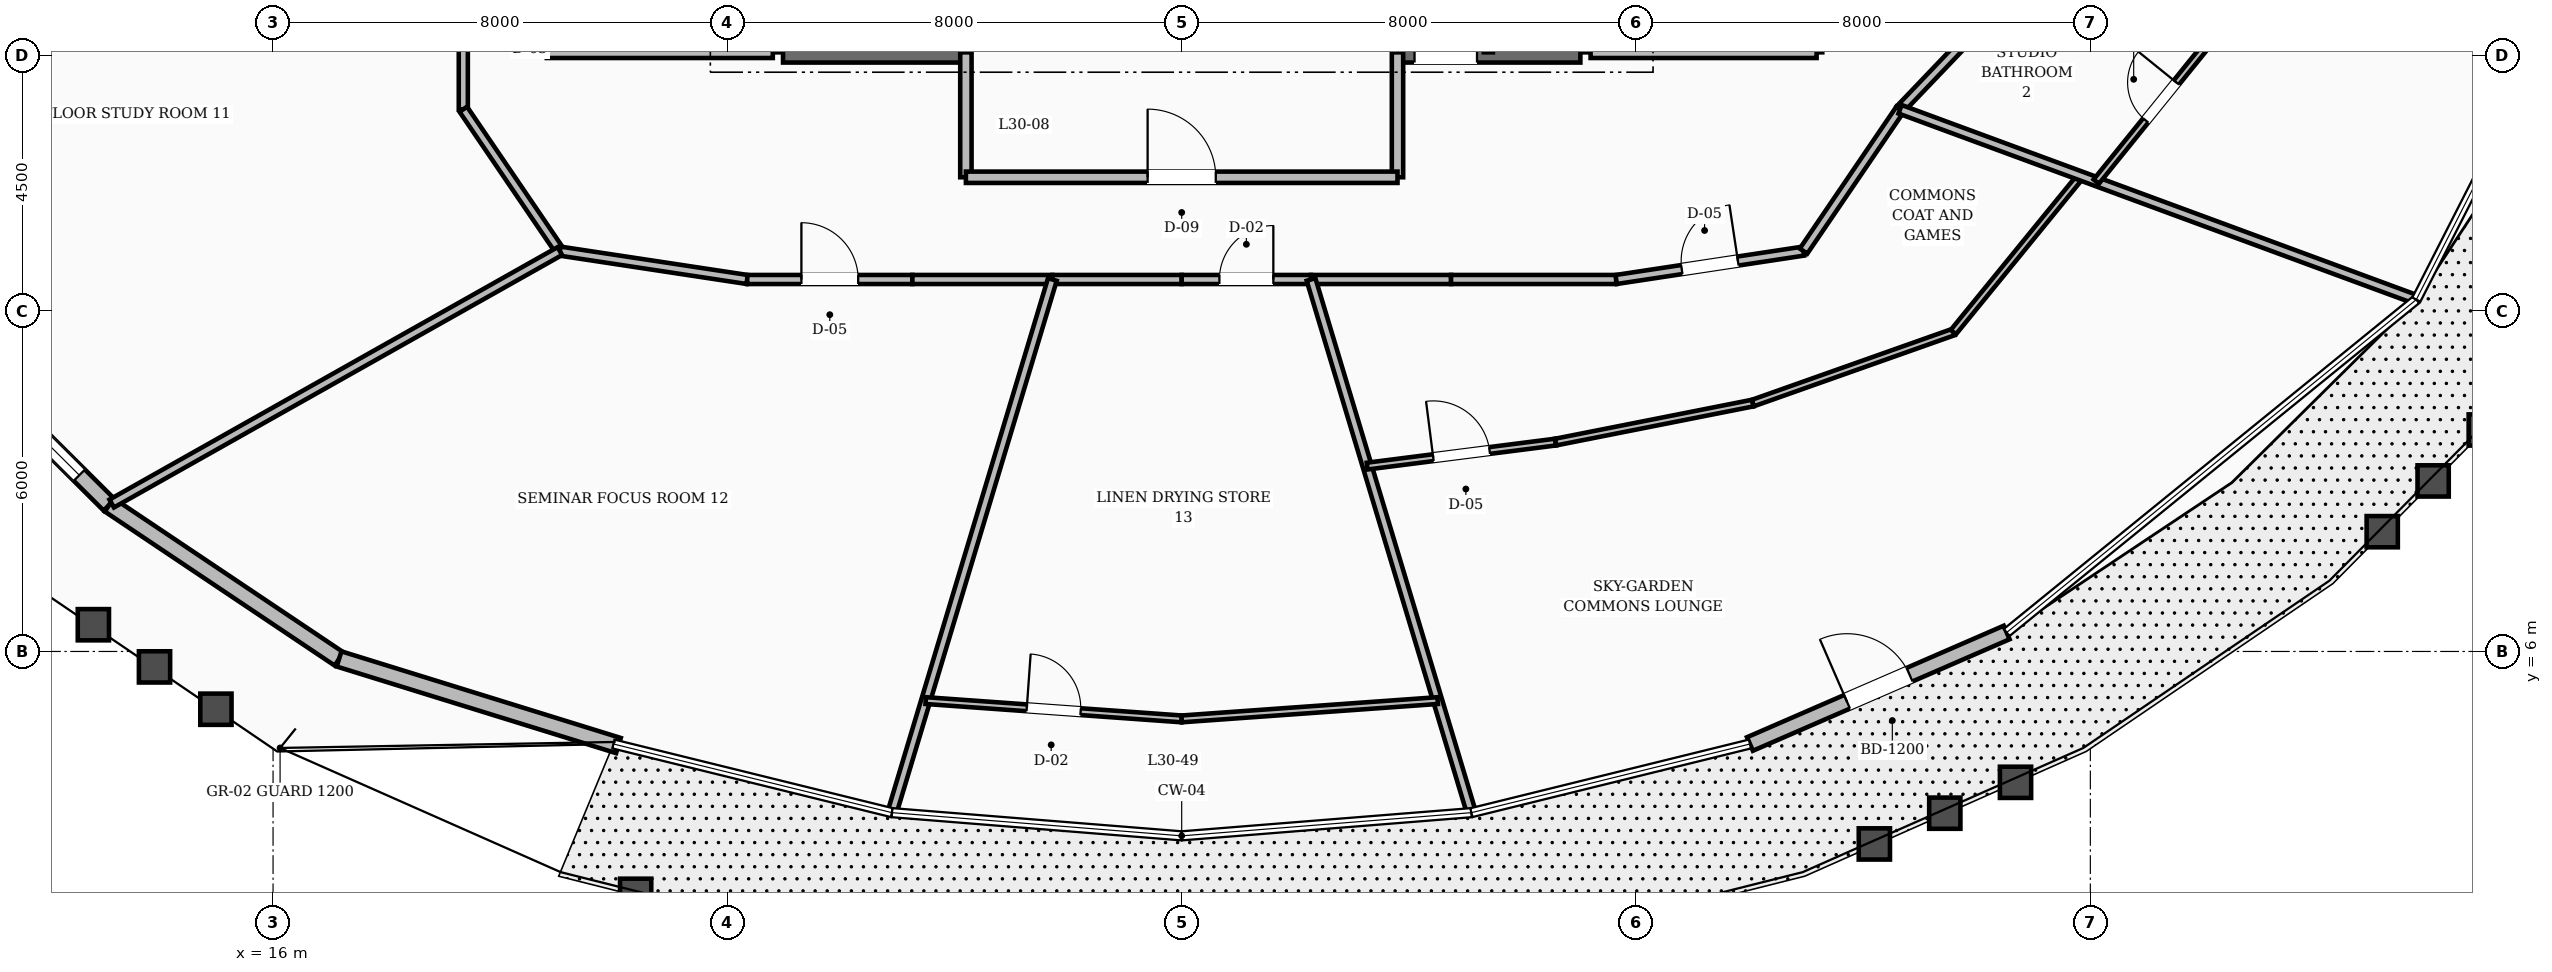
"""IFC4 building model, lengths in metres.
Left out: names, types, materials, properties, quantities, classifications, styles, units other than length and angle.
Written with IfcOpenShell. Run it as: python <this file> out.ifc"""

import sys

from ifc_helpers import new_model, si_unit, direction, frame, frame_2d, origin, place, context, subcontext, project, spatial, rectangle, extrude, element, fill, save


model = new_model("IFC4")
c1 = context("Model", 3, precision=1e-05, world=origin(), true_north=direction((0.0, 1.0)))
c2 = subcontext(c1, "Body", "Model", "MODEL_VIEW")
j1 = project(units=[si_unit("LENGTHUNIT", "METRE"), si_unit("PLANEANGLEUNIT", "RADIAN")], contexts=[c1])
p1 = place(None, origin())
s1 = spatial("IfcSite", under=j1, at=p1, CompositionType="ELEMENT")
p2 = place(p1, origin())
s2 = spatial("IfcBuilding", under=s1, at=p2, CompositionType="ELEMENT")
p3 = place(p2, frame((0.0, 0.0, 120.8)))
s3 = spatial("IfcBuildingStorey", under=s2, at=p3, CompositionType="ELEMENT", Elevation=120.8)
p4 = place(p3, frame((24.98, 16.55, 0.0), z_axis=(0.0, 0.0, 1.0), x_axis=(1.0, 0.0, 0.0)))
e1 = element("IfcWall", 1, at=p4, inside=s3, PredefinedType="SHEAR", context=c2, shape_type="SweptSolid", body=[
    extrude(rectangle(XDim=3.22, YDim=0.36, at=frame_2d((1.61, 0.0))), origin(), (0.0, 0.0, 1.0), 3.6),
])
p5 = place(p3, frame((35.8, 16.55, 0.0), z_axis=(0.0, 0.0, 1.0), x_axis=(1.0, 0.0, 0.0)))
e2 = element("IfcWall", 2, at=p5, inside=s3, PredefinedType="SHEAR", context=c2, shape_type="SweptSolid", body=[
    extrude(rectangle(XDim=3.22, YDim=0.36, at=frame_2d((1.61, 0.0))), origin(), (0.0, 0.0, 1.0), 3.6),
])
p6 = place(p5, frame((0.3, 0.0, 0.0)))
e3 = element("IfcOpeningElement", 3, at=p6, cuts=e2, PredefinedType="OPENING", context=c2, shape_type="SweptSolid", body=[
    extrude(rectangle(XDim=1.1, YDim=2.1, at=frame_2d((0.55, 1.05))), frame((0.0, 0.19, 0.0), z_axis=(0.0, -1.0, 0.0), x_axis=(1.0, 0.0, 0.0)), (0.0, 0.0, 1.0), 0.38),
])
p7 = place(p3, frame((9.794, 11.885, 0.0), z_axis=(0.0, 0.0, 1.0), x_axis=(0.708876231206, -0.705332892208, 0.0)))
e4 = element("IfcWall", 4, at=p7, inside=s3, PredefinedType="STANDARD", context=c2, shape_type="SweptSolid", body=[
    extrude(rectangle(XDim=4.685, YDim=0.28, at=frame_2d((2.343, 0.0))), origin(), (0.0, 0.0, 1.0), 2.82),
])
p8 = place(p7, frame((0.743, 0.0, 0.8)))
e5 = element("IfcOpeningElement", 5, at=p8, cuts=e4, PredefinedType="OPENING", context=c2, shape_type="SweptSolid", body=[
    extrude(rectangle(XDim=3.2, YDim=1.65, at=frame_2d((1.6, 0.825))), frame((0.0, 0.15, 0.0), z_axis=(0.0, -1.0, 0.0), x_axis=(1.0, 0.0, 0.0)), (0.0, 0.0, 1.0), 0.3),
])
p9 = place(p3, frame((13.115, 8.58, 0.0), z_axis=(0.0, 0.0, 1.0), x_axis=(0.830737301714, -0.556664652678, 0.0)))
e6 = element("IfcWall", 6, at=p9, inside=s3, PredefinedType="STANDARD", context=c2, shape_type="SweptSolid", body=[
    extrude(rectangle(XDim=4.872, YDim=0.28, at=frame_2d((2.436, 0.0))), origin(), (0.0, 0.0, 1.0), 2.82),
])
p10 = place(p3, frame((17.162, 5.868, 0.0), z_axis=(0.0, 0.0, 1.0), x_axis=(0.955164029164, -0.2960771477, 0.0)))
e7 = element("IfcWall", 7, at=p10, inside=s3, PredefinedType="STANDARD", context=c2, shape_type="SweptSolid", body=[
    extrude(rectangle(XDim=5.15, YDim=0.28, at=frame_2d((2.575, 0.0))), origin(), (0.0, 0.0, 1.0), 2.82),
])
p11 = place(p3, frame((42.006, 4.37, 0.0), z_axis=(0.0, 0.0, 1.0), x_axis=(0.917222773232, 0.398374678242, 0.0)))
e8 = element("IfcWall", 8, at=p11, inside=s3, PredefinedType="STANDARD", context=c2, shape_type="SweptSolid", body=[
    extrude(rectangle(XDim=4.928, YDim=0.26, at=frame_2d((2.464, 0.0))), origin(), (0.0, 0.0, 1.0), 2.82),
])
p12 = place(p11, frame((1.864, 0.0, 0.0)))
e9 = element("IfcOpeningElement", 9, at=p12, cuts=e8, PredefinedType="OPENING", context=c2, shape_type="SweptSolid", body=[
    extrude(rectangle(XDim=1.2, YDim=2.15, at=frame_2d((0.6, 1.075))), frame((0.0, 0.14, 0.0), z_axis=(0.0, -1.0, 0.0), x_axis=(1.0, 0.0, 0.0)), (0.0, 0.0, 1.0), 0.28),
])
for number, where, z_axis, x_axis in (
    (10, (20.82, 16.55, 0.0), (0.0, 0.0, 1.0), (1.0, 0.0, 0.0)),
    (11, (39.2, 16.55, 0.0), (0.0, 0.0, 1.0), (1.0, 0.0, 0.0)),
):
    element("IfcWall", number, at=place(p3, frame(where, z_axis=z_axis, x_axis=x_axis)), inside=s3, PredefinedType="SOLIDWALL", context=c2, shape_type="SweptSolid", body=[
        extrude(rectangle(XDim=3.98, YDim=0.2, at=frame_2d((1.99, 0.0))), origin(), (0.0, 0.0, 1.0), 2.8),
    ])
for number, where, z_axis, x_axis in (
    (12, (28.2, 14.35, 0.0), (0.0, 0.0, 1.0), (0.0, 1.0, 0.0)),
    (13, (35.8, 14.35, 0.0), (0.0, 0.0, 1.0), (0.0, 1.0, 0.0)),
):
    element("IfcWall", number, at=place(p3, frame(where, z_axis=z_axis, x_axis=x_axis)), inside=s3, PredefinedType="SOLIDWALL", context=c2, shape_type="SweptSolid", body=[
        extrude(rectangle(XDim=2.2, YDim=0.2, at=frame_2d((1.1, 0.0))), origin(), (0.0, 0.0, 1.0), 2.8),
    ])
p13 = place(p3, frame((28.2, 14.35, 0.0), z_axis=(0.0, 0.0, 1.0), x_axis=(1.0, 0.0, 0.0)))
e14 = element("IfcWall", 14, at=p13, inside=s3, PredefinedType="SOLIDWALL", context=c2, shape_type="SweptSolid", body=[
    extrude(rectangle(XDim=7.6, YDim=0.2, at=frame_2d((3.8, 0.0))), origin(), (0.0, 0.0, 1.0), 2.8),
])
p14 = place(p13, frame((3.2, 0.0, 0.0)))
e15 = element("IfcOpeningElement", 15, at=p14, cuts=e14, PredefinedType="OPENING", context=c2, shape_type="SweptSolid", body=[
    extrude(rectangle(XDim=1.2, YDim=2.1, at=frame_2d((0.6, 1.05))), frame((0.0, 0.11, 0.0), z_axis=(0.0, -1.0, 0.0), x_axis=(1.0, 0.0, 0.0)), (0.0, 0.0, 1.0), 0.22),
])
p15 = place(p3, frame((19.35, 18.76, 0.0), z_axis=(0.0, 0.0, 1.0), x_axis=(0.0, -1.0, 0.0)))
e16 = element("IfcWall", 16, at=p15, inside=s3, PredefinedType="SOLIDWALL", context=c2, shape_type="SweptSolid", body=[
    extrude(rectangle(XDim=3.213, YDim=0.16, at=frame_2d((1.606, 0.0))), origin(), (0.0, 0.0, 1.0), 2.8),
])
p16 = place(p15, frame((1.106, 0.0, 0.0)))
e17 = element("IfcOpeningElement", 17, at=p16, cuts=e16, PredefinedType="OPENING", context=c2, shape_type="SweptSolid", body=[
    extrude(rectangle(XDim=1.0, YDim=2.1, at=frame_2d((0.5, 1.05))), frame((0.0, 0.09, 0.0), z_axis=(0.0, -1.0, 0.0), x_axis=(1.0, 0.0, 0.0)), (0.0, 0.0, 1.0), 0.18),
])
p17 = place(p3, frame((19.35, 15.548, 0.0), z_axis=(0.0, 0.0, 1.0), x_axis=(0.562674669208, -0.826678423955, 0.0)))
e18 = element("IfcWall", 18, at=p17, inside=s3, PredefinedType="SOLIDWALL", context=c2, shape_type="SweptSolid", body=[
    extrude(rectangle(XDim=3.021, YDim=0.16, at=frame_2d((1.511, 0.0))), origin(), (0.0, 0.0, 1.0), 2.8),
])
p18 = place(p3, frame((21.05, 13.05, 0.0), z_axis=(0.0, 0.0, 1.0), x_axis=(0.988710906508, -0.149835721217, 0.0)))
e19 = element("IfcWall", 19, at=p18, inside=s3, PredefinedType="SOLIDWALL", context=c2, shape_type="SweptSolid", body=[
    extrude(rectangle(XDim=3.337, YDim=0.16, at=frame_2d((1.668, 0.0))), origin(), (0.0, 0.0, 1.0), 2.8),
])
p19 = place(p3, frame((24.349, 12.55, 0.0), z_axis=(0.0, 0.0, 1.0), x_axis=(1.0, 0.0, 0.0)))
e20 = element("IfcWall", 20, at=p19, inside=s3, PredefinedType="SOLIDWALL", context=c2, shape_type="SweptSolid", body=[
    extrude(rectangle(XDim=2.908, YDim=0.16, at=frame_2d((1.454, 0.0))), origin(), (0.0, 0.0, 1.0), 2.8),
])
p20 = place(p19, frame((0.954, 0.0, 0.0)))
e21 = element("IfcOpeningElement", 21, at=p20, cuts=e20, PredefinedType="OPENING", context=c2, shape_type="SweptSolid", body=[
    extrude(rectangle(XDim=1.0, YDim=2.1, at=frame_2d((0.5, 1.05))), frame((0.0, 0.09, 0.0), z_axis=(0.0, -1.0, 0.0), x_axis=(1.0, 0.0, 0.0)), (0.0, 0.0, 1.0), 0.18),
])
p21 = place(p3, frame((27.257, 12.55, 0.0), z_axis=(0.0, 0.0, 1.0), x_axis=(1.0, 0.0, 0.0)))
e22 = element("IfcWall", 22, at=p21, inside=s3, PredefinedType="SOLIDWALL", context=c2, shape_type="SweptSolid", body=[
    extrude(rectangle(XDim=2.465, YDim=0.16, at=frame_2d((1.232, 0.0))), origin(), (0.0, 0.0, 1.0), 2.8),
])
p22 = place(p3, frame((29.722, 12.55, 0.0), z_axis=(0.0, 0.0, 1.0), x_axis=(1.0, 0.0, 0.0)))
e23 = element("IfcWall", 23, at=p22, inside=s3, PredefinedType="SOLIDWALL", context=c2, shape_type="SweptSolid", body=[
    extrude(rectangle(XDim=2.278, YDim=0.16, at=frame_2d((1.139, 0.0))), origin(), (0.0, 0.0, 1.0), 2.8),
])
p23 = place(p3, frame((32.0, 12.55, 0.0), z_axis=(0.0, 0.0, 1.0), x_axis=(1.0, 0.0, 0.0)))
e24 = element("IfcWall", 24, at=p23, inside=s3, PredefinedType="SOLIDWALL", context=c2, shape_type="SweptSolid", body=[
    extrude(rectangle(XDim=2.278, YDim=0.16, at=frame_2d((1.139, 0.0))), origin(), (0.0, 0.0, 1.0), 2.8),
])
p24 = place(p23, frame((0.664, 0.0, 0.0)))
e25 = element("IfcOpeningElement", 25, at=p24, cuts=e24, PredefinedType="OPENING", context=c2, shape_type="SweptSolid", body=[
    extrude(rectangle(XDim=0.95, YDim=2.1, at=frame_2d((0.475, 1.05))), frame((0.0, 0.09, 0.0), z_axis=(0.0, -1.0, 0.0), x_axis=(1.0, 0.0, 0.0)), (0.0, 0.0, 1.0), 0.18),
])
p25 = place(p3, frame((34.278, 12.55, 0.0), z_axis=(0.0, 0.0, 1.0), x_axis=(1.0, 0.0, 0.0)))
e26 = element("IfcWall", 26, at=p25, inside=s3, PredefinedType="SOLIDWALL", context=c2, shape_type="SweptSolid", body=[
    extrude(rectangle(XDim=2.465, YDim=0.16, at=frame_2d((1.232, 0.0))), origin(), (0.0, 0.0, 1.0), 2.8),
])
p26 = place(p3, frame((36.743, 12.55, 0.0), z_axis=(0.0, 0.0, 1.0), x_axis=(1.0, 0.0, 0.0)))
e27 = element("IfcWall", 27, at=p26, inside=s3, PredefinedType="SOLIDWALL", context=c2, shape_type="SweptSolid", body=[
    extrude(rectangle(XDim=2.908, YDim=0.16, at=frame_2d((1.454, 0.0))), origin(), (0.0, 0.0, 1.0), 2.8),
])
p27 = place(p3, frame((39.651, 12.55, 0.0), z_axis=(0.0, 0.0, 1.0), x_axis=(0.988710906508, 0.149835721217, 0.0)))
e28 = element("IfcWall", 28, at=p27, inside=s3, PredefinedType="SOLIDWALL", context=c2, shape_type="SweptSolid", body=[
    extrude(rectangle(XDim=3.337, YDim=0.16, at=frame_2d((1.668, 0.0))), origin(), (0.0, 0.0, 1.0), 2.8),
])
p28 = place(p27, frame((1.168, 0.0, 0.0)))
e29 = element("IfcOpeningElement", 29, at=p28, cuts=e28, PredefinedType="OPENING", context=c2, shape_type="SweptSolid", body=[
    extrude(rectangle(XDim=1.0, YDim=2.1, at=frame_2d((0.5, 1.05))), frame((0.0, 0.09, 0.0), z_axis=(0.0, -1.0, 0.0), x_axis=(1.0, 0.0, 0.0)), (0.0, 0.0, 1.0), 0.18),
])
p29 = place(p3, frame((42.95, 13.05, 0.0), z_axis=(0.0, 0.0, 1.0), x_axis=(0.562674669208, 0.826678423955, 0.0)))
e30 = element("IfcWall", 30, at=p29, inside=s3, PredefinedType="SOLIDWALL", context=c2, shape_type="SweptSolid", body=[
    extrude(rectangle(XDim=3.021, YDim=0.16, at=frame_2d((1.511, 0.0))), origin(), (0.0, 0.0, 1.0), 2.8),
])
p30 = place(p3, frame((44.65, 15.548, 0.0), z_axis=(0.0, 0.0, 1.0), x_axis=(0.691055487108, 0.722801711216, 0.0)))
e31 = element("IfcWall", 31, at=p30, inside=s3, PredefinedType="SOLIDWALL", context=c2, shape_type="SweptSolid", body=[
    extrude(rectangle(XDim=3.184, YDim=0.16, at=frame_2d((1.592, 0.0))), origin(), (0.0, 0.0, 1.0), 2.8),
])
p31 = place(p3, frame((34.278, 12.55, 0.0), z_axis=(0.0, 0.0, 1.0), x_axis=(0.287990783487, -0.957633180621, 0.0)))
e32 = element("IfcWall", 32, at=p31, inside=s3, PredefinedType="SOLIDWALL", context=c2, shape_type="SweptSolid", body=[
    extrude(rectangle(XDim=9.754, YDim=0.16, at=frame_2d((4.877, 0.0))), origin(), (0.0, 0.0, 1.0), 2.8),
])
p32 = place(p3, frame((35.266, 9.264, 0.0), z_axis=(0.0, 0.0, 1.0), x_axis=(0.991974135638, 0.126440951534, 0.0)))
e33 = element("IfcWall", 33, at=p32, inside=s3, PredefinedType="PARTITIONING", context=c2, shape_type="SweptSolid", body=[
    extrude(rectangle(XDim=3.346, YDim=0.12, at=frame_2d((1.673, 0.0))), origin(), (0.0, 0.0, 1.0), 2.8),
])
p33 = place(p32, frame((1.173, 0.0, 0.0)))
e34 = element("IfcOpeningElement", 34, at=p33, cuts=e33, PredefinedType="OPENING", context=c2, shape_type="SweptSolid", body=[
    extrude(rectangle(XDim=1.0, YDim=2.1, at=frame_2d((0.5, 1.05))), frame((0.0, 0.07, 0.0), z_axis=(0.0, -1.0, 0.0), x_axis=(1.0, 0.0, 0.0)), (0.0, 0.0, 1.0), 0.14),
])
p34 = place(p3, frame((38.585, 9.687, 0.0), z_axis=(0.0, 0.0, 1.0), x_axis=(0.980968713549, 0.194165864762, 0.0)))
e35 = element("IfcWall", 35, at=p34, inside=s3, PredefinedType="PARTITIONING", context=c2, shape_type="SweptSolid", body=[
    extrude(rectangle(XDim=3.54, YDim=0.12, at=frame_2d((1.77, 0.0))), origin(), (0.0, 0.0, 1.0), 2.8),
])
p35 = place(p3, frame((42.057, 10.374, 0.0), z_axis=(0.0, 0.0, 1.0), x_axis=(0.942681905686, 0.333692709977, 0.0)))
e36 = element("IfcWall", 36, at=p35, inside=s3, PredefinedType="PARTITIONING", context=c2, shape_type="SweptSolid", body=[
    extrude(rectangle(XDim=3.746, YDim=0.12, at=frame_2d((1.873, 0.0))), origin(), (0.0, 0.0, 1.0), 2.8),
])
p36 = place(p3, frame((45.588, 11.624, 0.0), z_axis=(0.0, 0.0, 1.0), x_axis=(0.632049552825, 0.774927972636, 0.0)))
e37 = element("IfcWall", 37, at=p36, inside=s3, PredefinedType="PARTITIONING", context=c2, shape_type="SweptSolid", body=[
    extrude(rectangle(XDim=3.549, YDim=0.12, at=frame_2d((1.774, 0.0))), origin(), (0.0, 0.0, 1.0), 2.8),
])
p37 = place(p3, frame((44.65, 15.548, 0.0), z_axis=(0.0, 0.0, 1.0), x_axis=(0.938256165997, -0.345941276764, 0.0)))
e38 = element("IfcWall", 38, at=p37, inside=s3, PredefinedType="SOLIDWALL", context=c2, shape_type="SweptSolid", body=[
    extrude(rectangle(XDim=9.639, YDim=0.16, at=frame_2d((4.819, 0.0))), origin(), (0.0, 0.0, 1.0), 2.8),
])
p38 = place(p3, frame((48.104, 14.274, 0.0), z_axis=(0.0, 0.0, 1.0), x_axis=(0.628681475745, 0.777662910299, 0.0)))
e39 = element("IfcWall", 39, at=p38, inside=s3, PredefinedType="PARTITIONING", context=c2, shape_type="SweptSolid", body=[
    extrude(rectangle(XDim=3.63, YDim=0.12, at=frame_2d((1.815, 0.0))), origin(), (0.0, 0.0, 1.0), 2.8),
])
p39 = place(p38, frame((1.385, 0.0, 0.0)))
e40 = element("IfcOpeningElement", 40, at=p39, cuts=e39, PredefinedType="OPENING", context=c2, shape_type="SweptSolid", body=[
    extrude(rectangle(XDim=0.86, YDim=2.1, at=frame_2d((0.43, 1.05))), frame((0.0, 0.07, 0.0), z_axis=(0.0, -1.0, 0.0), x_axis=(1.0, 0.0, 0.0)), (0.0, 0.0, 1.0), 0.14),
])
p40 = place(p3, frame((21.05, 13.05, 0.0), z_axis=(0.0, 0.0, 1.0), x_axis=(-0.871265811463, -0.490811456442, 0.0)))
e41 = element("IfcWall", 41, at=p40, inside=s3, PredefinedType="SOLIDWALL", context=c2, shape_type="SweptSolid", body=[
    extrude(rectangle(XDim=9.057, YDim=0.16, at=frame_2d((4.529, 0.0))), origin(), (0.0, 0.0, 1.0), 2.8),
])
p41 = place(p3, frame((29.722, 12.55, 0.0), z_axis=(0.0, 0.0, 1.0), x_axis=(-0.287990783487, -0.957633180621, 0.0)))
e42 = element("IfcWall", 42, at=p41, inside=s3, PredefinedType="SOLIDWALL", context=c2, shape_type="SweptSolid", body=[
    extrude(rectangle(XDim=9.754, YDim=0.16, at=frame_2d((4.877, 0.0))), origin(), (0.0, 0.0, 1.0), 2.8),
])
p42 = place(p3, frame((27.492, 5.135, 0.0), z_axis=(0.0, 0.0, 1.0), x_axis=(0.997450191448, -0.071366067427, 0.0)))
e43 = element("IfcWall", 43, at=p42, inside=s3, PredefinedType="PARTITIONING", context=c2, shape_type="SweptSolid", body=[
    extrude(rectangle(XDim=4.519, YDim=0.12, at=frame_2d((2.26, 0.0))), origin(), (0.0, 0.0, 1.0), 2.8),
])
p43 = place(p42, frame((1.784, 0.0, 0.0)))
e44 = element("IfcOpeningElement", 44, at=p43, cuts=e43, PredefinedType="OPENING", context=c2, shape_type="SweptSolid", body=[
    extrude(rectangle(XDim=0.95, YDim=2.1, at=frame_2d((0.475, 1.05))), frame((0.0, 0.07, 0.0), z_axis=(0.0, -1.0, 0.0), x_axis=(1.0, 0.0, 0.0)), (0.0, 0.0, 1.0), 0.14),
])
p44 = place(p3, frame((32.0, 4.812, 0.0), z_axis=(0.0, 0.0, 1.0), x_axis=(0.997450191448, 0.071366067427, 0.0)))
e45 = element("IfcWall", 45, at=p44, inside=s3, PredefinedType="PARTITIONING", context=c2, shape_type="SweptSolid", body=[
    extrude(rectangle(XDim=4.519, YDim=0.12, at=frame_2d((2.26, 0.0))), origin(), (0.0, 0.0, 1.0), 2.8),
])
p45 = place(p8, origin())
e46 = element("IfcWindow", 46, at=p45, inside=s3, PartitioningType="SINGLE_PANEL", PredefinedType="WINDOW", context=c2, shape_type="SweptSolid", body=[
    extrude(rectangle(XDim=3.2, YDim=1.65, at=frame_2d((1.6, 0.825))), frame((0.0, 0.03, 0.0), z_axis=(0.0, -1.0, 0.0), x_axis=(1.0, 0.0, 0.0)), (0.0, 0.0, 1.0), 0.06),
])
fill(e5, e46)
p46 = place(p12, origin())
e47 = element("IfcDoor", 47, at=p46, inside=s3, OperationType="SINGLE_SWING_LEFT", PredefinedType="DOOR", context=c2, shape_type="SweptSolid", body=[
    extrude(rectangle(XDim=1.2, YDim=2.15, at=frame_2d((0.6, 1.075))), frame((0.0, 0.025, 0.0), z_axis=(0.0, -1.0, 0.0), x_axis=(1.0, 0.0, 0.0)), (0.0, 0.0, 1.0), 0.05),
])
fill(e9, e47)
p47 = place(p6, origin())
e48 = element("IfcDoor", 48, at=p47, inside=s3, OperationType="SINGLE_SWING_RIGHT", PredefinedType="DOOR", context=c2, shape_type="SweptSolid", body=[
    extrude(rectangle(XDim=1.1, YDim=2.1, at=frame_2d((0.55, 1.05))), frame((0.0, 0.025, 0.0), z_axis=(0.0, -1.0, 0.0), x_axis=(1.0, 0.0, 0.0)), (0.0, 0.0, 1.0), 0.05),
])
fill(e3, e48)
p48 = place(p14, origin())
e49 = element("IfcDoor", 49, at=p48, inside=s3, OperationType="SINGLE_SWING_LEFT", PredefinedType="DOOR", context=c2, shape_type="SweptSolid", body=[
    extrude(rectangle(XDim=1.2, YDim=2.1, at=frame_2d((0.6, 1.05))), frame((0.0, 0.025, 0.0), z_axis=(0.0, -1.0, 0.0), x_axis=(1.0, 0.0, 0.0)), (0.0, 0.0, 1.0), 0.05),
])
fill(e15, e49)
p49 = place(p28, origin())
e50 = element("IfcDoor", 50, at=p49, inside=s3, OperationType="SINGLE_SWING_RIGHT", PredefinedType="DOOR", context=c2, shape_type="SweptSolid", body=[
    extrude(rectangle(XDim=1.0, YDim=2.1, at=frame_2d((0.5, 1.05))), frame((0.0, 0.025, 0.0), z_axis=(0.0, -1.0, 0.0), x_axis=(1.0, 0.0, 0.0)), (0.0, 0.0, 1.0), 0.05),
])
fill(e29, e50)
p50 = place(p33, origin())
e51 = element("IfcDoor", 51, at=p50, inside=s3, OperationType="SINGLE_SWING_LEFT", PredefinedType="DOOR", context=c2, shape_type="SweptSolid", body=[
    extrude(rectangle(XDim=1.0, YDim=2.1, at=frame_2d((0.5, 1.05))), frame((0.0, 0.025, 0.0), z_axis=(0.0, -1.0, 0.0), x_axis=(1.0, 0.0, 0.0)), (0.0, 0.0, 1.0), 0.05),
])
fill(e34, e51)
p51 = place(p39, origin())
e52 = element("IfcDoor", 52, at=p51, inside=s3, OperationType="SINGLE_SWING_RIGHT", PredefinedType="DOOR", context=c2, shape_type="SweptSolid", body=[
    extrude(rectangle(XDim=0.86, YDim=2.1, at=frame_2d((0.43, 1.05))), frame((0.0, 0.025, 0.0), z_axis=(0.0, -1.0, 0.0), x_axis=(1.0, 0.0, 0.0)), (0.0, 0.0, 1.0), 0.05),
])
fill(e40, e52)
p52 = place(p20, origin())
e53 = element("IfcDoor", 53, at=p52, inside=s3, OperationType="SINGLE_SWING_LEFT", PredefinedType="DOOR", context=c2, shape_type="SweptSolid", body=[
    extrude(rectangle(XDim=1.0, YDim=2.1, at=frame_2d((0.5, 1.05))), frame((0.0, 0.025, 0.0), z_axis=(0.0, -1.0, 0.0), x_axis=(1.0, 0.0, 0.0)), (0.0, 0.0, 1.0), 0.05),
])
fill(e21, e53)
p53 = place(p24, origin())
e54 = element("IfcDoor", 54, at=p53, inside=s3, OperationType="SINGLE_SWING_RIGHT", PredefinedType="DOOR", context=c2, shape_type="SweptSolid", body=[
    extrude(rectangle(XDim=0.95, YDim=2.1, at=frame_2d((0.475, 1.05))), frame((0.0, 0.025, 0.0), z_axis=(0.0, -1.0, 0.0), x_axis=(1.0, 0.0, 0.0)), (0.0, 0.0, 1.0), 0.05),
])
fill(e25, e54)
p54 = place(p43, origin())
e55 = element("IfcDoor", 55, at=p54, inside=s3, OperationType="SINGLE_SWING_LEFT", PredefinedType="DOOR", context=c2, shape_type="SweptSolid", body=[
    extrude(rectangle(XDim=0.95, YDim=2.1, at=frame_2d((0.475, 1.05))), frame((0.0, 0.025, 0.0), z_axis=(0.0, -1.0, 0.0), x_axis=(1.0, 0.0, 0.0)), (0.0, 0.0, 1.0), 0.05),
])
fill(e44, e55)
save(model, sys.argv[1])
